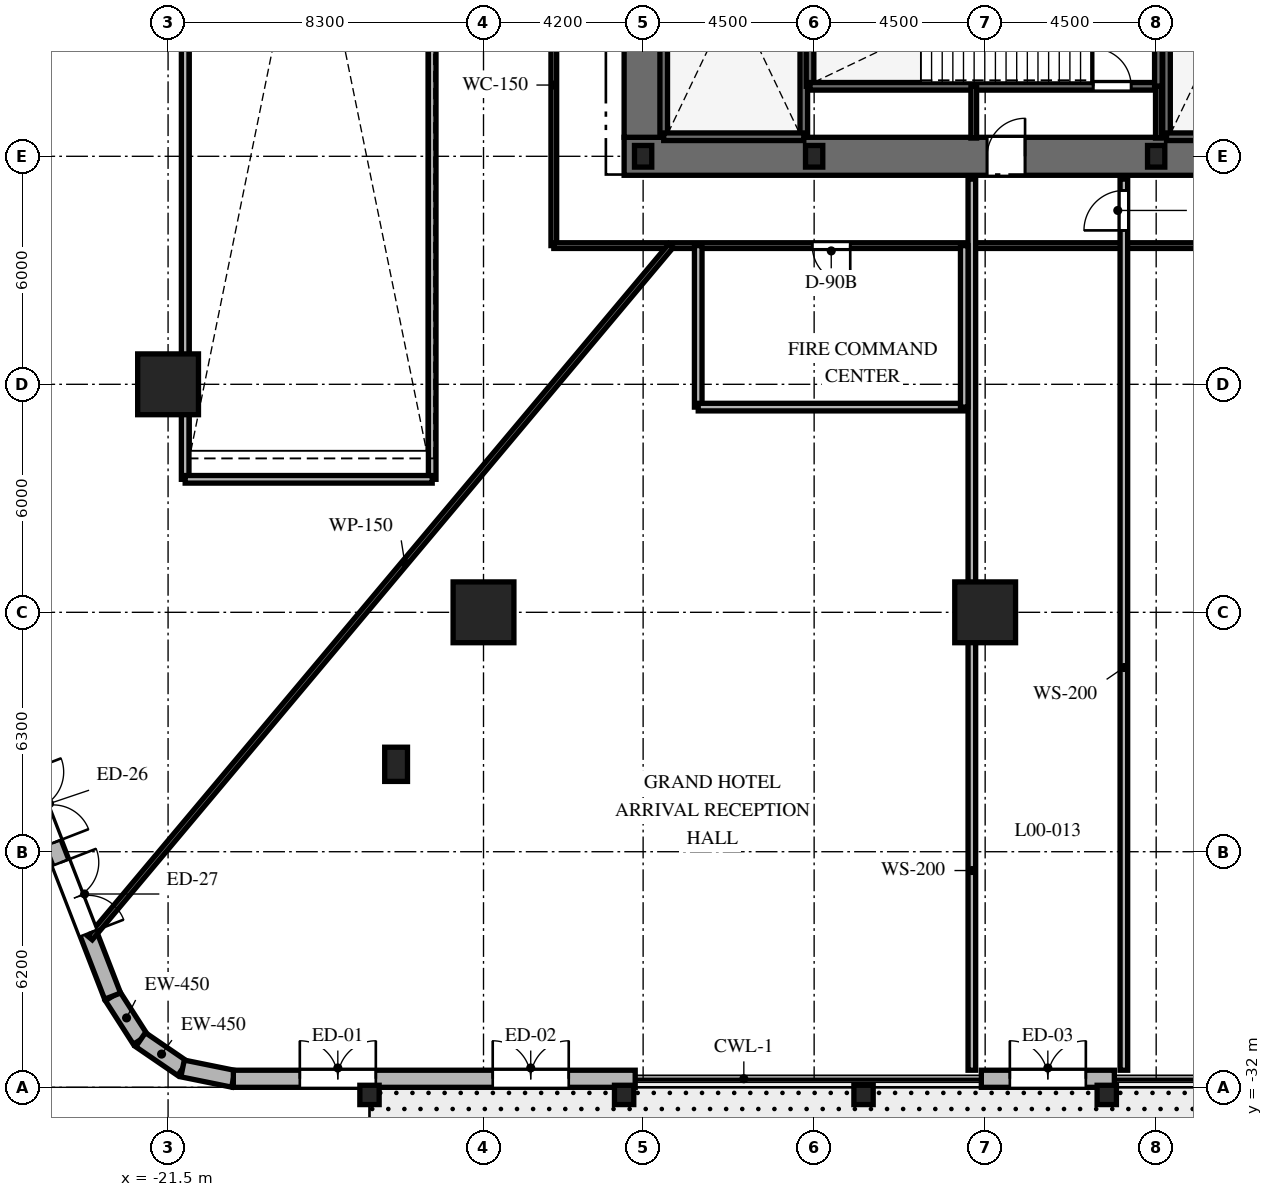
"""IFC4 building model, lengths in metres.
Left out: names, types, materials, properties, quantities, classifications, styles, units other than length and angle.
Written with IfcOpenShell. Run it as: python <this file> out.ifc"""

import sys

from ifc_helpers import new_model, si_unit, direction, frame, frame_2d, origin, origin_2d, place, context, subcontext, project, spatial, rectangle, hollow_circle, i_section, extrude, element, fill, save


model = new_model("IFC4")
c1 = context("Model", 3, precision=1e-05, world=origin(), true_north=direction((0.0, 1.0)))
c2 = subcontext(c1, "Body", "Model", "MODEL_VIEW")
j1 = project(units=[si_unit("LENGTHUNIT", "METRE"), si_unit("PLANEANGLEUNIT", "RADIAN")], contexts=[c1])
p1 = place(None, origin())
s1 = spatial("IfcSite", under=j1, at=p1, CompositionType="ELEMENT")
p2 = place(p1, origin())
s2 = spatial("IfcBuilding", under=s1, at=p2, CompositionType="ELEMENT")
p3 = place(p2, origin())
s3 = spatial("IfcBuildingStorey", under=s2, at=p3, CompositionType="ELEMENT", Elevation=0.0)
for number, where, z_axis, x_axis in (
    (1, (-16.2, -32.2, 0.0), (0.0, 0.0, 1.0), (1.0, 0.0, 0.0)),
    (2, (-9.5, -32.2, 0.0), (0.0, 0.0, 1.0), (1.0, 0.0, 0.0)),
    (3, (-3.2, -32.2, 0.0), (0.0, 0.0, 1.0), (1.0, 0.0, 0.0)),
    (4, (3.2, -32.2, 0.0), (0.0, 0.0, 1.0), (1.0, 0.0, 0.0)),
):
    element("IfcColumn", number, at=place(p3, frame(where, z_axis=z_axis, x_axis=x_axis)), inside=s3, PredefinedType="COLUMN", context=c2, shape_type="SweptSolid", body=[
        extrude(hollow_circle(Radius=0.254, WallThickness=0.02, at=origin_2d()), origin(), (0.0, 0.0, 1.0), 5.2),
    ])
p4 = place(p3, frame((-9.5, -7.5, 0.0), z_axis=(0.0, 0.0, 1.0), x_axis=(1.0, 0.0, 0.0)))
e5 = element("IfcWall", 5, at=p4, inside=s3, PredefinedType="SHEAR", context=c2, shape_type="SweptSolid", body=[
    extrude(rectangle(XDim=19.0, YDim=1.0, at=frame_2d((9.5, 0.0))), origin(), (0.0, 0.0, 1.0), 6.0),
])
p5 = place(p4, frame((9.55, 0.0, 0.0)))
e6 = element("IfcOpeningElement", 6, at=p5, cuts=e5, PredefinedType="OPENING", context=c2, shape_type="SweptSolid", body=[
    extrude(rectangle(XDim=1.0, YDim=2.15, at=frame_2d((0.5, 1.075))), frame((0.0, 0.51, 0.0), z_axis=(0.0, -1.0, 0.0), x_axis=(1.0, 0.0, 0.0)), (0.0, 0.0, 1.0), 1.02),
])
p6 = place(p3, frame((-9.0, -7.0, 0.0), z_axis=(0.0, 0.0, 1.0), x_axis=(0.0, 1.0, 0.0)))
e7 = element("IfcWall", 7, at=p6, inside=s3, PredefinedType="SHEAR", context=c2, shape_type="SweptSolid", body=[
    extrude(rectangle(XDim=14.0, YDim=1.0, at=frame_2d((7.0, 0.0))), origin(), (0.0, 0.0, 1.0), 6.0),
])
p7 = place(p6, frame((10.125, 0.0, 0.0)))
e8 = element("IfcOpeningElement", 8, at=p7, cuts=e7, PredefinedType="OPENING", context=c2, shape_type="SweptSolid", body=[
    extrude(rectangle(XDim=1.05, YDim=2.15, at=frame_2d((0.525, 1.075))), frame((0.0, 0.51, 0.0), z_axis=(0.0, -1.0, 0.0), x_axis=(1.0, 0.0, 0.0)), (0.0, 0.0, 1.0), 1.02),
])
for number, where, z_axis, x_axis in (
    (9, (-8.458, -6.985, 0.0), (0.0, 0.0, 1.0), (0.0, 1.0, 0.0)),
    (10, (-4.772, -6.985, 0.0), (0.0, 0.0, 1.0), (0.0, 1.0, 0.0)),
):
    element("IfcWall", number, at=place(p3, frame(where, z_axis=z_axis, x_axis=x_axis)), inside=s3, PredefinedType="SHEAR", context=c2, shape_type="SweptSolid", body=[
        extrude(rectangle(XDim=9.143, YDim=0.2, at=frame_2d((4.572, 0.0))), origin(), (0.0, 0.0, 1.0), 6.0),
    ])
p8 = place(p3, frame((-8.458, -6.985, 0.0), z_axis=(0.0, 0.0, 1.0), x_axis=(1.0, 0.0, 0.0)))
e11 = element("IfcWall", 11, at=p8, inside=s3, PredefinedType="SHEAR", context=c2, shape_type="SweptSolid", body=[
    extrude(rectangle(XDim=3.686, YDim=0.2, at=frame_2d((1.843, 0.0))), origin(), (0.0, 0.0, 1.0), 6.0),
])
p9 = place(p3, frame((4.772, -6.985, 0.0), z_axis=(0.0, 0.0, 1.0), x_axis=(0.0, 1.0, 0.0)))
e12 = element("IfcWall", 12, at=p9, inside=s3, PredefinedType="SHEAR", context=c2, shape_type="SweptSolid", body=[
    extrude(rectangle(XDim=9.143, YDim=0.2, at=frame_2d((4.572, 0.0))), origin(), (0.0, 0.0, 1.0), 6.0),
])
for number, where, z_axis, x_axis in (
    (13, (4.772, -6.985, 0.0), (0.0, 0.0, 1.0), (1.0, 0.0, 0.0)),
    (14, (-4.608, -5.658, 0.0), (0.0, 0.0, 1.0), (0.0, 1.0, 0.0)),
):
    element("IfcWall", number, at=place(p3, frame(where, z_axis=z_axis, x_axis=x_axis)), inside=s3, PredefinedType="SHEAR", context=c2, shape_type="SweptSolid", body=[
        extrude(rectangle(XDim=3.686, YDim=0.2, at=frame_2d((1.843, 0.0))), origin(), (0.0, 0.0, 1.0), 6.0),
    ])
p10 = place(p3, frame((-4.608, -5.658, 0.0), z_axis=(0.0, 0.0, 1.0), x_axis=(1.0, 0.0, 0.0)))
e15 = element("IfcWall", 15, at=p10, inside=s3, PredefinedType="SHEAR", context=c2, shape_type="SweptSolid", body=[
    extrude(rectangle(XDim=9.166, YDim=0.2, at=frame_2d((4.583, 0.0))), origin(), (0.0, 0.0, 1.0), 6.0),
])
p11 = place(p10, frame((7.45, 0.0, 0.0)))
e16 = element("IfcOpeningElement", 16, at=p11, cuts=e15, PredefinedType="OPENING", context=c2, shape_type="SweptSolid", body=[
    extrude(rectangle(XDim=1.0, YDim=2.15, at=frame_2d((0.5, 1.075))), frame((0.0, 0.11, 0.0), z_axis=(0.0, -1.0, 0.0), x_axis=(1.0, 0.0, 0.0)), (0.0, 0.0, 1.0), 0.22),
])
p12 = place(p3, frame((4.558, -5.658, 0.0), z_axis=(0.0, 0.0, 1.0), x_axis=(0.0, 1.0, 0.0)))
e17 = element("IfcWall", 17, at=p12, inside=s3, PredefinedType="SHEAR", context=c2, shape_type="SweptSolid", body=[
    extrude(rectangle(XDim=3.686, YDim=0.2, at=frame_2d((1.843, 0.0))), origin(), (0.0, 0.0, 1.0), 6.0),
])
for number, where, z_axis, x_axis in (
    (18, (-9.0, -7.5, 0.0), (0.0, 0.0, 1.0), (1.0, 0.0, 0.0)),
    (19, (-4.5, -7.5, 0.0), (0.0, 0.0, 1.0), (1.0, 0.0, 0.0)),
    (20, (4.5, -7.5, 0.0), (0.0, 0.0, 1.0), (1.0, 0.0, 0.0)),
):
    element("IfcColumn", number, at=place(p3, frame(where, z_axis=z_axis, x_axis=x_axis)), inside=s3, PredefinedType="COLUMN", context=c2, shape_type="SweptSolid", body=[
        extrude(i_section(OverallWidth=0.454, OverallDepth=0.569, WebThickness=0.078, FlangeThickness=0.125, at=origin_2d()), origin(), (0.0, 0.0, 1.0), 6.0),
    ])
for number, where, z_axis, x_axis in (
    (21, (-21.5, -13.5, 0.0), (0.0, 0.0, 1.0), (1.0, 0.0, 0.0)),
    (22, (-13.2, -19.5, 0.0), (0.0, 0.0, 1.0), (1.0, 0.0, 0.0)),
    (23, (0.0, -19.5, 0.0), (0.0, 0.0, 1.0), (1.0, 0.0, 0.0)),
):
    element("IfcColumn", number, at=place(p3, frame(where, z_axis=z_axis, x_axis=x_axis)), inside=s3, PredefinedType="COLUMN", context=c2, shape_type="SweptSolid", body=[
        extrude(rectangle(XDim=1.6, YDim=1.6, at=origin_2d()), origin(), (0.0, 0.0, 1.0), 6.0),
    ])
p13 = place(p3, frame((-15.5, -23.5, 0.0), z_axis=(0.0, 0.0, 1.0), x_axis=(1.0, 0.0, 0.0)))
e24 = element("IfcColumn", 24, at=p13, inside=s3, PredefinedType="PILASTER", context=c2, shape_type="SweptSolid", body=[
    extrude(rectangle(XDim=0.6, YDim=0.9, at=origin_2d()), origin(), (0.0, 0.0, 1.0), 6.0),
])
p14 = place(p3, frame((-22.96, -29.6, 0.0), z_axis=(0.0, 0.0, 1.0), x_axis=(0.539770293074, -0.841812348873, 0.0)))
e25 = element("IfcWall", 25, at=p14, inside=s3, PredefinedType="SOLIDWALL", context=c2, shape_type="SweptSolid", body=[
    extrude(rectangle(XDim=1.363, YDim=0.45, at=frame_2d((0.681, 0.0))), origin(), (0.0, 0.0, 1.0), 4.65),
])
p15 = place(p3, frame((-22.224, -30.747, 0.0), z_axis=(0.0, 0.0, 1.0), x_axis=(0.825034601946, -0.565082211357, 0.0)))
e26 = element("IfcWall", 26, at=p15, inside=s3, PredefinedType="SOLIDWALL", context=c2, shape_type="SweptSolid", body=[
    extrude(rectangle(XDim=1.34, YDim=0.45, at=frame_2d((0.67, 0.0))), origin(), (0.0, 0.0, 1.0), 4.65),
])
p16 = place(p3, frame((-21.118, -31.504, 0.0), z_axis=(0.0, 0.0, 1.0), x_axis=(0.980074574112, -0.198629879877, 0.0)))
e27 = element("IfcWall", 27, at=p16, inside=s3, PredefinedType="SOLIDWALL", context=c2, shape_type="SweptSolid", body=[
    extrude(rectangle(XDim=1.363, YDim=0.45, at=frame_2d((0.682, 0.0))), origin(), (0.0, 0.0, 1.0), 4.65),
])
p17 = place(p3, frame((-19.782, -31.775, 0.0), z_axis=(0.0, 0.0, 1.0), x_axis=(1.0, 0.0, 0.0)))
e28 = element("IfcWall", 28, at=p17, inside=s3, PredefinedType="SOLIDWALL", context=c2, shape_type="SweptSolid", body=[
    extrude(rectangle(XDim=10.574, YDim=0.45, at=frame_2d((5.287, 0.0))), origin(), (0.0, 0.0, 1.0), 4.65),
])
p18 = place(p17, frame((1.749, 0.0, 0.0)))
e29 = element("IfcOpeningElement", 29, at=p18, cuts=e28, PredefinedType="OPENING", context=c2, shape_type="SweptSolid", body=[
    extrude(rectangle(XDim=2.0, YDim=2.4, at=frame_2d((1.0, 1.2))), frame((0.0, 0.235, 0.0), z_axis=(0.0, -1.0, 0.0), x_axis=(1.0, 0.0, 0.0)), (0.0, 0.0, 1.0), 0.47),
])
p19 = place(p17, frame((6.825, 0.0, 0.0)))
e30 = element("IfcOpeningElement", 30, at=p19, cuts=e28, PredefinedType="OPENING", context=c2, shape_type="SweptSolid", body=[
    extrude(rectangle(XDim=2.0, YDim=2.4, at=frame_2d((1.0, 1.2))), frame((0.0, 0.235, 0.0), z_axis=(0.0, -1.0, 0.0), x_axis=(1.0, 0.0, 0.0)), (0.0, 0.0, 1.0), 0.47),
])
p20 = place(p3, frame((-0.101, -31.775, 0.0), z_axis=(0.0, 0.0, 1.0), x_axis=(1.0, 0.0, 0.0)))
e31 = element("IfcWall", 31, at=p20, inside=s3, PredefinedType="SOLIDWALL", context=c2, shape_type="SweptSolid", body=[
    extrude(rectangle(XDim=3.5, YDim=0.45, at=frame_2d((1.75, 0.0))), origin(), (0.0, 0.0, 1.0), 4.65),
])
p21 = place(p20, frame((0.75, 0.0, 0.0)))
e32 = element("IfcOpeningElement", 32, at=p21, cuts=e31, PredefinedType="OPENING", context=c2, shape_type="SweptSolid", body=[
    extrude(rectangle(XDim=2.0, YDim=2.4, at=frame_2d((1.0, 1.2))), frame((0.0, 0.235, 0.0), z_axis=(0.0, -1.0, 0.0), x_axis=(1.0, 0.0, 0.0)), (0.0, 0.0, 1.0), 0.47),
])
p22 = place(p3, frame((-25.562, -22.891, 0.0), z_axis=(0.0, 0.0, 1.0), x_axis=(0.361665095845, -0.932308081295, 0.0)))
e33 = element("IfcWall", 33, at=p22, inside=s3, PredefinedType="SOLIDWALL", context=c2, shape_type="SweptSolid", body=[
    extrude(rectangle(XDim=7.195, YDim=0.45, at=frame_2d((3.598, 0.0))), origin(), (0.0, 0.0, 1.0), 4.65),
])
p23 = place(p22, frame((0.871, 0.0, 0.0)))
e34 = element("IfcOpeningElement", 34, at=p23, cuts=e33, PredefinedType="OPENING", context=c2, shape_type="SweptSolid", body=[
    extrude(rectangle(XDim=2.0, YDim=2.4, at=frame_2d((1.0, 1.2))), frame((0.0, 0.235, 0.0), z_axis=(0.0, -1.0, 0.0), x_axis=(1.0, 0.0, 0.0)), (0.0, 0.0, 1.0), 0.47),
])
p24 = place(p22, frame((3.424, 0.0, 0.0)))
e35 = element("IfcOpeningElement", 35, at=p24, cuts=e33, PredefinedType="OPENING", context=c2, shape_type="SweptSolid", body=[
    extrude(rectangle(XDim=2.0, YDim=2.4, at=frame_2d((1.0, 1.2))), frame((0.0, 0.235, 0.0), z_axis=(0.0, -1.0, 0.0), x_axis=(1.0, 0.0, 0.0)), (0.0, 0.0, 1.0), 0.47),
])
for number, where, z_axis, x_axis in (
    (36, (-0.3, -7.02, 0.0), (0.0, 0.0, 1.0), (0.0, 1.0, 0.0)),
    (37, (4.558, -7.02, 0.0), (0.0, 0.0, 1.0), (0.0, 1.0, 0.0)),
):
    element("IfcWall", number, at=place(p3, frame(where, z_axis=z_axis, x_axis=x_axis)), inside=s3, PredefinedType="PARTITIONING", context=c2, shape_type="SweptSolid", body=[
        extrude(rectangle(XDim=1.362, YDim=0.15, at=frame_2d((0.681, 0.0))), origin(), (0.0, 0.0, 1.0), 5.68),
    ])
p25 = place(p3, frame((-11.35, -9.85, 0.0), z_axis=(0.0, 0.0, 1.0), x_axis=(0.0, 1.0, 0.0)))
e38 = element("IfcWall", 38, at=p25, inside=s3, PredefinedType="PARTITIONING", context=c2, shape_type="SweptSolid", body=[
    extrude(rectangle(XDim=19.7, YDim=0.15, at=frame_2d((9.85, 0.0))), origin(), (0.0, 0.0, 1.0), 4.722),
])
p26 = place(p25, frame((9.35, 0.0, 0.0)))
e39 = element("IfcOpeningElement", 39, at=p26, cuts=e38, PredefinedType="OPENING", context=c2, shape_type="SweptSolid", body=[
    extrude(rectangle(XDim=1.0, YDim=2.03, at=frame_2d((0.5, 1.015))), frame((0.0, 0.085, 0.0), z_axis=(0.0, -1.0, 0.0), x_axis=(1.0, 0.0, 0.0)), (0.0, 0.0, 1.0), 0.17),
])
p27 = place(p3, frame((11.35, -9.85, 0.0), z_axis=(0.0, 0.0, 1.0), x_axis=(-1.0, 0.0, 0.0)))
e40 = element("IfcWall", 40, at=p27, inside=s3, PredefinedType="PARTITIONING", context=c2, shape_type="SweptSolid", body=[
    extrude(rectangle(XDim=22.7, YDim=0.15, at=frame_2d((11.35, 0.0))), origin(), (0.0, 0.0, 1.0), 4.722),
])
p28 = place(p27, frame((14.9, 0.0, 0.0)))
e41 = element("IfcOpeningElement", 41, at=p28, cuts=e40, PredefinedType="OPENING", context=c2, shape_type="SweptSolid", body=[
    extrude(rectangle(XDim=1.0, YDim=2.15, at=frame_2d((0.5, 1.075))), frame((0.0, 0.085, 0.0), z_axis=(0.0, -1.0, 0.0), x_axis=(1.0, 0.0, 0.0)), (0.0, 0.0, 1.0), 0.17),
])
p29 = place(p3, frame((-0.35, -31.55, 0.0), z_axis=(0.0, 0.0, 1.0), x_axis=(0.0, 1.0, 0.0)))
e42 = element("IfcWall", 42, at=p29, inside=s3, PredefinedType="PARTITIONING", context=c2, shape_type="SweptSolid", body=[
    extrude(rectangle(XDim=23.45, YDim=0.2, at=frame_2d((11.725, 0.0))), origin(), (0.0, 0.0, 1.0), 4.729),
])
p30 = place(p3, frame((3.65, -31.55, 0.0), z_axis=(0.0, 0.0, 1.0), x_axis=(0.0, 1.0, 0.0)))
e43 = element("IfcWall", 43, at=p30, inside=s3, PredefinedType="PARTITIONING", context=c2, shape_type="SweptSolid", body=[
    extrude(rectangle(XDim=23.45, YDim=0.2, at=frame_2d((11.725, 0.0))), origin(), (0.0, 0.0, 1.0), 4.729),
])
p31 = place(p30, frame((22.1, 0.0, 0.0)))
e44 = element("IfcOpeningElement", 44, at=p31, cuts=e43, PredefinedType="OPENING", context=c2, shape_type="SweptSolid", body=[
    extrude(rectangle(XDim=1.05, YDim=2.15, at=frame_2d((0.525, 1.075))), frame((0.0, 0.11, 0.0), z_axis=(0.0, -1.0, 0.0), x_axis=(1.0, 0.0, 0.0)), (0.0, 0.0, 1.0), 0.22),
])
p32 = place(p3, frame((-7.55, -14.1, 0.0), z_axis=(0.0, 0.0, 1.0), x_axis=(0.0, 1.0, 0.0)))
e45 = element("IfcWall", 45, at=p32, inside=s3, PredefinedType="PARTITIONING", context=c2, shape_type="SweptSolid", body=[
    extrude(rectangle(XDim=4.25, YDim=0.2, at=frame_2d((2.125, 0.0))), origin(), (0.0, 0.0, 1.0), 5.68),
])
p33 = place(p3, frame((-7.55, -14.1, 0.0), z_axis=(0.0, 0.0, 1.0), x_axis=(1.0, 0.0, 0.0)))
e46 = element("IfcWall", 46, at=p33, inside=s3, PredefinedType="PARTITIONING", context=c2, shape_type="SweptSolid", body=[
    extrude(rectangle(XDim=7.0, YDim=0.2, at=frame_2d((3.5, 0.0))), origin(), (0.0, 0.0, 1.0), 5.68),
])
p34 = place(p3, frame((-0.55, -14.1, 0.0), z_axis=(0.0, 0.0, 1.0), x_axis=(0.0, 1.0, 0.0)))
e47 = element("IfcWall", 47, at=p34, inside=s3, PredefinedType="PARTITIONING", context=c2, shape_type="SweptSolid", body=[
    extrude(rectangle(XDim=4.25, YDim=0.2, at=frame_2d((2.125, 0.0))), origin(), (0.0, 0.0, 1.0), 5.68),
])
for number, where, z_axis, x_axis in (
    (48, (-21.05, -16.0, 0.0), (0.0, 0.0, 1.0), (0.0, 1.0, 0.0)),
    (49, (-14.55, -16.0, 0.0), (0.0, 0.0, 1.0), (0.0, 1.0, 0.0)),
):
    element("IfcWall", number, at=place(p3, frame(where, z_axis=z_axis, x_axis=x_axis)), inside=s3, PredefinedType="PARTITIONING", context=c2, shape_type="SweptSolid", body=[
        extrude(rectangle(XDim=47.6, YDim=0.2, at=frame_2d((23.8, 0.0))), origin(), (0.0, 0.0, 1.0), 4.67),
    ])
p35 = place(p3, frame((-21.05, -16.0, 0.0), z_axis=(0.0, 0.0, 1.0), x_axis=(1.0, 0.0, 0.0)))
e50 = element("IfcWall", 50, at=p35, inside=s3, PredefinedType="PARTITIONING", context=c2, shape_type="SweptSolid", body=[
    extrude(rectangle(XDim=6.5, YDim=0.2, at=frame_2d((3.25, 0.0))), origin(), (0.0, 0.0, 1.0), 4.814),
])
p36 = place(p3, frame((-8.265, -9.85, 0.0), z_axis=(0.0, 0.0, 1.0), x_axis=(-0.642790692764, -0.766041856099, 0.0)))
e51 = element("IfcWall", 51, at=p36, inside=s3, PredefinedType="PARTITIONING", context=c2, shape_type="SweptSolid", body=[
    extrude(rectangle(XDim=23.784, YDim=0.15, at=frame_2d((11.892, 0.0))), origin(), (0.0, 0.0, 1.0), 4.67),
])
p37 = place(p18, origin())
e52 = element("IfcDoor", 52, at=p37, inside=s3, OperationType="DOUBLE_SWING_LEFT", PredefinedType="DOOR", context=c2, shape_type="SweptSolid", body=[
    extrude(rectangle(XDim=2.0, YDim=2.4, at=frame_2d((1.0, 1.2))), frame((0.0, 0.025, 0.0), z_axis=(0.0, -1.0, 0.0), x_axis=(1.0, 0.0, 0.0)), (0.0, 0.0, 1.0), 0.05),
])
fill(e29, e52)
p38 = place(p19, origin())
e53 = element("IfcDoor", 53, at=p38, inside=s3, OperationType="DOUBLE_SWING_LEFT", PredefinedType="DOOR", context=c2, shape_type="SweptSolid", body=[
    extrude(rectangle(XDim=2.0, YDim=2.4, at=frame_2d((1.0, 1.2))), frame((0.0, 0.025, 0.0), z_axis=(0.0, -1.0, 0.0), x_axis=(1.0, 0.0, 0.0)), (0.0, 0.0, 1.0), 0.05),
])
fill(e30, e53)
p39 = place(p21, origin())
e54 = element("IfcDoor", 54, at=p39, inside=s3, OperationType="DOUBLE_SWING_LEFT", PredefinedType="DOOR", context=c2, shape_type="SweptSolid", body=[
    extrude(rectangle(XDim=2.0, YDim=2.4, at=frame_2d((1.0, 1.2))), frame((0.0, 0.025, 0.0), z_axis=(0.0, -1.0, 0.0), x_axis=(1.0, 0.0, 0.0)), (0.0, 0.0, 1.0), 0.05),
])
fill(e32, e54)
p40 = place(p23, origin())
e55 = element("IfcDoor", 55, at=p40, inside=s3, OperationType="DOUBLE_SWING_LEFT", PredefinedType="DOOR", context=c2, shape_type="SweptSolid", body=[
    extrude(rectangle(XDim=2.0, YDim=2.4, at=frame_2d((1.0, 1.2))), frame((0.0, 0.025, 0.0), z_axis=(0.0, -1.0, 0.0), x_axis=(1.0, 0.0, 0.0)), (0.0, 0.0, 1.0), 0.05),
])
fill(e34, e55)
p41 = place(p24, origin())
e56 = element("IfcDoor", 56, at=p41, inside=s3, OperationType="DOUBLE_SWING_LEFT", PredefinedType="DOOR", context=c2, shape_type="SweptSolid", body=[
    extrude(rectangle(XDim=2.0, YDim=2.4, at=frame_2d((1.0, 1.2))), frame((0.0, 0.025, 0.0), z_axis=(0.0, -1.0, 0.0), x_axis=(1.0, 0.0, 0.0)), (0.0, 0.0, 1.0), 0.05),
])
fill(e35, e56)
p42 = place(p11, origin())
e57 = element("IfcDoor", 57, at=p42, inside=s3, OperationType="SINGLE_SWING_LEFT", PredefinedType="DOOR", context=c2, shape_type="SweptSolid", body=[
    extrude(rectangle(XDim=1.0, YDim=2.15, at=frame_2d((0.5, 1.075))), frame((0.0, 0.025, 0.0), z_axis=(0.0, -1.0, 0.0), x_axis=(1.0, 0.0, 0.0)), (0.0, 0.0, 1.0), 0.05),
])
fill(e16, e57)
p43 = place(p5, origin())
e58 = element("IfcDoor", 58, at=p43, inside=s3, OperationType="SINGLE_SWING_RIGHT", PredefinedType="DOOR", context=c2, shape_type="SweptSolid", body=[
    extrude(rectangle(XDim=1.0, YDim=2.15, at=frame_2d((0.5, 1.075))), frame((0.0, 0.025, 0.0), z_axis=(0.0, -1.0, 0.0), x_axis=(1.0, 0.0, 0.0)), (0.0, 0.0, 1.0), 0.05),
])
fill(e6, e58)
p44 = place(p31, origin())
e59 = element("IfcDoor", 59, at=p44, inside=s3, OperationType="SINGLE_SWING_LEFT", PredefinedType="DOOR", context=c2, shape_type="SweptSolid", body=[
    extrude(rectangle(XDim=1.05, YDim=2.15, at=frame_2d((0.525, 1.075))), frame((0.0, 0.025, 0.0), z_axis=(0.0, -1.0, 0.0), x_axis=(1.0, 0.0, 0.0)), (0.0, 0.0, 1.0), 0.05),
])
fill(e44, e59)
p45 = place(p28, origin())
e60 = element("IfcDoor", 60, at=p45, inside=s3, OperationType="SINGLE_SWING_LEFT", PredefinedType="DOOR", context=c2, shape_type="SweptSolid", body=[
    extrude(rectangle(XDim=1.0, YDim=2.15, at=frame_2d((0.5, 1.075))), frame((0.0, 0.025, 0.0), z_axis=(0.0, -1.0, 0.0), x_axis=(1.0, 0.0, 0.0)), (0.0, 0.0, 1.0), 0.05),
])
fill(e41, e60)
save(model, sys.argv[1])
